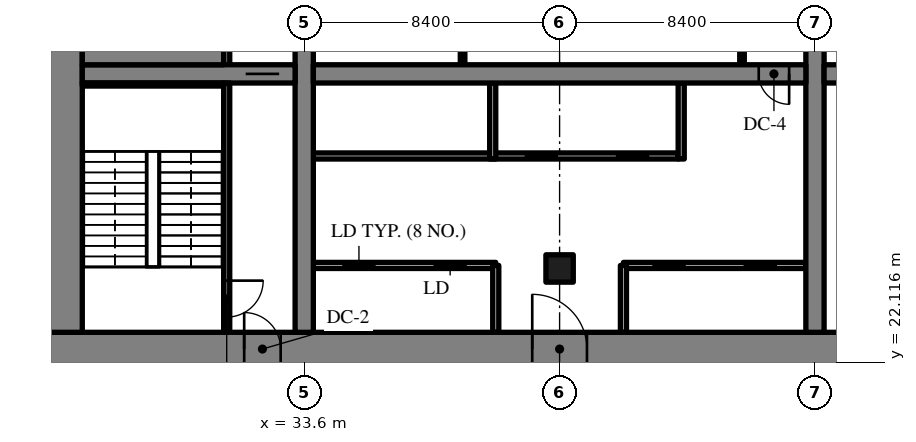
"""IFC4 building model, lengths in metres.
Left out: names, types, materials, properties, quantities, classifications, styles, units other than length and angle.
Written with IfcOpenShell. Run it as: python <this file> out.ifc"""

import sys

from ifc_helpers import new_model, si_unit, direction, frame, frame_2d, origin, origin_2d, place, context, subcontext, project, spatial, rectangle, extrude, source, transform, mapped, element, fill, save


model = new_model("IFC4")
c1 = context("Model", 3, precision=1e-05, world=origin(), true_north=direction((0.0, 1.0)))
c2 = subcontext(c1, "Body", "Model", "MODEL_VIEW")
j1 = project(units=[si_unit("LENGTHUNIT", "METRE"), si_unit("PLANEANGLEUNIT", "RADIAN")], contexts=[c1])
p1 = place(None, origin())
s1 = spatial("IfcSite", under=j1, at=p1, CompositionType="ELEMENT")
p2 = place(p1, origin())
s2 = spatial("IfcBuilding", under=s1, at=p2, CompositionType="ELEMENT")
p3 = place(p2, frame((0.0, 0.0, -4.5)))
s3 = spatial("IfcBuildingStorey", under=s2, at=p3, CompositionType="ELEMENT", Elevation=-4.5)
m1 = source(origin(), c2, "Body", "SweptSolid", [
    extrude(rectangle(XDim=50.4, YDim=1.1, at=frame_2d((25.2, 0.0))), origin(), (0.0, 0.0, 1.0), 4.22),
])
p4 = place(p3, frame((25.2, 22.55, 0.0), z_axis=(0.0, 0.0, 1.0), x_axis=(1.0, 0.0, 0.0)))
e1 = element("IfcWall", 1, at=p4, inside=s3, PredefinedType="SHEAR", context=c2, shape_type="MappedRepresentation", body=[
    mapped(m1, transform((0.0, 0.0, 0.0), scale=1.0)),
])
m2 = source(origin(), c2, "Body", "SweptSolid", [
    extrude(rectangle(XDim=1.8, YDim=2.1, at=frame_2d((0.9, 1.05))), frame((0.0, 0.56, 0.0), z_axis=(0.0, -1.0, 0.0), x_axis=(1.0, 0.0, 0.0)), (0.0, 0.0, 1.0), 1.12),
])
p5 = place(p4, frame((15.9, 0.0, 0.0)))
e2 = element("IfcOpeningElement", 2, at=p5, cuts=e1, PredefinedType="OPENING", context=c2, shape_type="MappedRepresentation", body=[
    mapped(m2, transform((0.0, 0.0, 0.0), scale=1.0)),
])
m3 = source(origin(), c2, "Body", "SweptSolid", [
    extrude(rectangle(XDim=1.2, YDim=2.1, at=frame_2d((0.6, 1.05))), frame((0.0, 0.56, 0.0), z_axis=(0.0, -1.0, 0.0), x_axis=(1.0, 0.0, 0.0)), (0.0, 0.0, 1.0), 1.12),
])
p6 = place(p4, frame((27.0, 0.0, 0.0)))
e3 = element("IfcOpeningElement", 3, at=p6, cuts=e1, PredefinedType="OPENING", context=c2, shape_type="MappedRepresentation", body=[
    mapped(m3, transform((0.0, 0.0, 0.0), scale=1.0)),
])
m4 = source(origin(), c2, "Body", "SweptSolid", [
    extrude(rectangle(XDim=0.9, YDim=2.1, at=frame_2d((0.45, 1.05))), frame((0.0, 0.56, 0.0), z_axis=(0.0, -1.0, 0.0), x_axis=(1.0, 0.0, 0.0)), (0.0, 0.0, 1.0), 1.12),
])
p7 = place(p4, frame((34.5, 0.0, 0.0)))
e4 = element("IfcOpeningElement", 4, at=p7, cuts=e1, PredefinedType="OPENING", context=c2, shape_type="MappedRepresentation", body=[
    mapped(m4, transform((0.0, 0.0, 0.0), scale=1.0)),
])
p8 = place(p4, frame((31.5, 0.0, 0.0)))
e5 = element("IfcOpeningElement", 5, at=p8, cuts=e1, PredefinedType="OPENING", context=c2, shape_type="MappedRepresentation", body=[
    mapped(m4, transform((0.0, 0.0, 0.0), scale=1.0)),
])
p9 = place(p4, frame((39.75, 0.0, 0.0)))
e6 = element("IfcOpeningElement", 6, at=p9, cuts=e1, PredefinedType="OPENING", context=c2, shape_type="MappedRepresentation", body=[
    mapped(m4, transform((0.0, 0.0, 0.0), scale=1.0)),
])
p10 = place(p4, frame((36.75, 0.0, 0.0)))
e7 = element("IfcOpeningElement", 7, at=p10, cuts=e1, PredefinedType="OPENING", context=c2, shape_type="MappedRepresentation", body=[
    mapped(m4, transform((0.0, 0.0, 0.0), scale=1.0)),
])
p11 = place(p4, frame((6.425, 0.0, 0.0)))
e8 = element("IfcOpeningElement", 8, at=p11, cuts=e1, PredefinedType="OPENING", context=c2, shape_type="MappedRepresentation", body=[
    mapped(m3, transform((0.0, 0.0, 0.0), scale=1.0)),
])
p12 = place(p4, frame((47.675, 0.0, 0.0)))
e9 = element("IfcOpeningElement", 9, at=p12, cuts=e1, PredefinedType="OPENING", context=c2, shape_type="MappedRepresentation", body=[
    mapped(m3, transform((0.0, 0.0, 0.0), scale=1.0)),
])
m5 = source(origin(), c2, "Body", "SweptSolid", [
    extrude(rectangle(XDim=17.8, YDim=1.1, at=frame_2d((8.9, 0.0))), origin(), (0.0, 0.0, 1.0), 4.22),
])
p13 = place(p3, frame((25.75, 23.1, 0.0), z_axis=(0.0, 0.0, 1.0), x_axis=(0.0, 1.0, 0.0)))
e10 = element("IfcWall", 10, at=p13, inside=s3, PredefinedType="SHEAR", context=c2, shape_type="MappedRepresentation", body=[
    mapped(m5, transform((0.0, 0.0, 0.0), scale=1.0)),
])
m6 = source(origin(), c2, "Body", "SweptSolid", [
    extrude(rectangle(XDim=17.8, YDim=0.6, at=frame_2d((8.9, 0.0))), origin(), (0.0, 0.0, 1.0), 4.22),
])
p14 = place(p3, frame((33.6, 23.1, 0.0), z_axis=(0.0, 0.0, 1.0), x_axis=(0.0, 1.0, 0.0)))
e11 = element("IfcWall", 11, at=p14, inside=s3, PredefinedType="SHEAR", context=c2, shape_type="MappedRepresentation", body=[
    mapped(m6, transform((0.0, 0.0, 0.0), scale=1.0)),
])
m7 = source(origin(), c2, "Body", "SweptSolid", [
    extrude(rectangle(XDim=1.1, YDim=2.1, at=frame_2d((0.55, 1.05))), frame((0.0, 0.31, 0.0), z_axis=(0.0, -1.0, 0.0), x_axis=(1.0, 0.0, 0.0)), (0.0, 0.0, 1.0), 0.62),
])
p15 = place(p14, frame((12.35, 0.0, 0.0)))
e12 = element("IfcOpeningElement", 12, at=p15, cuts=e11, PredefinedType="OPENING", context=c2, shape_type="MappedRepresentation", body=[
    mapped(m7, transform((0.0, 0.0, 0.0), scale=1.0)),
])
p16 = place(p3, frame((50.4, 23.1, 0.0), z_axis=(0.0, 0.0, 1.0), x_axis=(0.0, 1.0, 0.0)))
e13 = element("IfcWall", 13, at=p16, inside=s3, PredefinedType="SHEAR", context=c2, shape_type="MappedRepresentation", body=[
    mapped(m6, transform((0.0, 0.0, 0.0), scale=1.0)),
])
p17 = place(p16, frame((12.35, 0.0, 0.0)))
e14 = element("IfcOpeningElement", 14, at=p17, cuts=e13, PredefinedType="OPENING", context=c2, shape_type="MappedRepresentation", body=[
    mapped(m7, transform((0.0, 0.0, 0.0), scale=1.0)),
])
m8 = source(origin(), c2, "Body", "SweptSolid", [
    extrude(rectangle(XDim=7.0, YDim=0.6, at=frame_2d((3.5, 0.0))), origin(), (0.0, 0.0, 1.0), 4.22),
])
p18 = place(p3, frame((26.3, 31.6, 0.0), z_axis=(0.0, 0.0, 1.0), x_axis=(1.0, 0.0, 0.0)))
e15 = element("IfcWall", 15, at=p18, inside=s3, PredefinedType="SHEAR", context=c2, shape_type="MappedRepresentation", body=[
    mapped(m8, transform((0.0, 0.0, 0.0), scale=1.0)),
])
p19 = place(p18, frame((5.375, 0.0, 0.0)))
e16 = element("IfcOpeningElement", 16, at=p19, cuts=e15, PredefinedType="OPENING", context=c2, shape_type="MappedRepresentation", body=[
    mapped(m7, transform((0.0, 0.0, 0.0), scale=1.0)),
])
m9 = source(origin(), c2, "Body", "SweptSolid", [
    extrude(rectangle(XDim=16.2, YDim=0.6, at=frame_2d((8.1, 0.0))), origin(), (0.0, 0.0, 1.0), 4.22),
])
p20 = place(p3, frame((33.9, 31.6, 0.0), z_axis=(0.0, 0.0, 1.0), x_axis=(1.0, 0.0, 0.0)))
e17 = element("IfcWall", 17, at=p20, inside=s3, PredefinedType="SHEAR", context=c2, shape_type="MappedRepresentation", body=[
    mapped(m9, transform((0.0, 0.0, 0.0), scale=1.0)),
])
m10 = source(origin(), c2, "Body", "SweptSolid", [
    extrude(rectangle(XDim=1.0, YDim=2.1, at=frame_2d((0.5, 1.05))), frame((0.0, 0.31, 0.0), z_axis=(0.0, -1.0, 0.0), x_axis=(1.0, 0.0, 0.0)), (0.0, 0.0, 1.0), 0.62),
])
p21 = place(p20, frame((14.65, 0.0, 0.0)))
e18 = element("IfcOpeningElement", 18, at=p21, cuts=e17, PredefinedType="OPENING", context=c2, shape_type="MappedRepresentation", body=[
    mapped(m10, transform((0.0, 0.0, 0.0), scale=1.0)),
])
m11 = source(origin(), c2, "Body", "SweptSolid", [
    extrude(rectangle(XDim=16.2, YDim=0.6, at=frame_2d((8.1, 0.0))), origin(), (0.0, 0.0, 1.0), 4.22),
])
p22 = place(p3, frame((50.7, 31.6, 0.0), z_axis=(0.0, 0.0, 1.0), x_axis=(1.0, 0.0, 0.0)))
e19 = element("IfcWall", 19, at=p22, inside=s3, PredefinedType="SHEAR", context=c2, shape_type="MappedRepresentation", body=[
    mapped(m11, transform((0.0, 0.0, 0.0), scale=1.0)),
])
p23 = place(p22, frame((0.55, 0.0, 0.0)))
e20 = element("IfcOpeningElement", 20, at=p23, cuts=e19, PredefinedType="OPENING", context=c2, shape_type="MappedRepresentation", body=[
    mapped(m10, transform((0.0, 0.0, 0.0), scale=1.0)),
])
m12 = source(origin(), c2, "Body", "SweptSolid", [
    extrude(rectangle(XDim=0.9, YDim=0.9, at=origin_2d()), origin(), (0.0, 0.0, 1.0), 4.22),
])
p24 = place(p3, frame((42.0, 25.2, 0.0), z_axis=(0.0, 0.0, 1.0), x_axis=(1.0, 0.0, 0.0)))
e21 = element("IfcColumn", 21, at=p24, inside=s3, PredefinedType="COLUMN", context=c2, shape_type="MappedRepresentation", body=[
    mapped(m12, transform((0.0, 0.0, 0.0), scale=1.0)),
])
m13 = source(origin(), c2, "Body", "SweptSolid", [
    extrude(rectangle(XDim=6.0, YDim=0.2, at=frame_2d((3.0, 0.0))), origin(), (0.0, 0.0, 1.0), 4.22),
])
p25 = place(p3, frame((33.9, 25.3, 0.0), z_axis=(0.0, 0.0, 1.0), x_axis=(1.0, 0.0, 0.0)))
e22 = element("IfcWall", 22, at=p25, inside=s3, PredefinedType="SOLIDWALL", context=c2, shape_type="MappedRepresentation", body=[
    mapped(m13, transform((0.0, 0.0, 0.0), scale=1.0)),
])
m14 = source(origin(), c2, "Body", "SweptSolid", [
    extrude(rectangle(XDim=1.1, YDim=2.1, at=frame_2d((0.55, 1.05))), frame((0.0, 0.11, 0.0), z_axis=(0.0, -1.0, 0.0), x_axis=(1.0, 0.0, 0.0)), (0.0, 0.0, 1.0), 0.22),
])
p26 = place(p25, frame((0.95, 0.0, 0.0)))
e23 = element("IfcOpeningElement", 23, at=p26, cuts=e22, PredefinedType="OPENING", context=c2, shape_type="MappedRepresentation", body=[
    mapped(m14, transform((0.0, 0.0, 0.0), scale=1.0)),
])
p27 = place(p25, frame((3.95, 0.0, 0.0)))
e24 = element("IfcOpeningElement", 24, at=p27, cuts=e22, PredefinedType="OPENING", context=c2, shape_type="MappedRepresentation", body=[
    mapped(m14, transform((0.0, 0.0, 0.0), scale=1.0)),
])
p28 = place(p3, frame((44.1, 25.3, 0.0), z_axis=(0.0, 0.0, 1.0), x_axis=(1.0, 0.0, 0.0)))
e25 = element("IfcWall", 25, at=p28, inside=s3, PredefinedType="SOLIDWALL", context=c2, shape_type="MappedRepresentation", body=[
    mapped(m13, transform((0.0, 0.0, 0.0), scale=1.0)),
])
p29 = place(p28, frame((0.95, 0.0, 0.0)))
e26 = element("IfcOpeningElement", 26, at=p29, cuts=e25, PredefinedType="OPENING", context=c2, shape_type="MappedRepresentation", body=[
    mapped(m14, transform((0.0, 0.0, 0.0), scale=1.0)),
])
p30 = place(p28, frame((3.95, 0.0, 0.0)))
e27 = element("IfcOpeningElement", 27, at=p30, cuts=e25, PredefinedType="OPENING", context=c2, shape_type="MappedRepresentation", body=[
    mapped(m14, transform((0.0, 0.0, 0.0), scale=1.0)),
])
m15 = source(origin(), c2, "Body", "SweptSolid", [
    extrude(rectangle(XDim=12.0, YDim=0.2, at=frame_2d((6.0, 0.0))), origin(), (0.0, 0.0, 1.0), 4.22),
])
p31 = place(p3, frame((33.9, 28.9, 0.0), z_axis=(0.0, 0.0, 1.0), x_axis=(1.0, 0.0, 0.0)))
e28 = element("IfcWall", 28, at=p31, inside=s3, PredefinedType="SOLIDWALL", context=c2, shape_type="MappedRepresentation", body=[
    mapped(m15, transform((0.0, 0.0, 0.0), scale=1.0)),
])
p32 = place(p31, frame((6.95, 0.0, 0.0)))
e29 = element("IfcOpeningElement", 29, at=p32, cuts=e28, PredefinedType="OPENING", context=c2, shape_type="MappedRepresentation", body=[
    mapped(m14, transform((0.0, 0.0, 0.0), scale=1.0)),
])
p33 = place(p31, frame((9.95, 0.0, 0.0)))
e30 = element("IfcOpeningElement", 30, at=p33, cuts=e28, PredefinedType="OPENING", context=c2, shape_type="MappedRepresentation", body=[
    mapped(m14, transform((0.0, 0.0, 0.0), scale=1.0)),
])
m16 = source(origin(), c2, "Body", "SweptSolid", [
    extrude(rectangle(XDim=2.2, YDim=0.2, at=frame_2d((1.1, 0.0))), origin(), (0.0, 0.0, 1.0), 4.22),
])
for number, where, z_axis, x_axis in (
    (31, (39.9, 23.1, 0.0), (0.0, 0.0, 1.0), (0.0, 1.0, 0.0)),
    (32, (44.1, 23.1, 0.0), (0.0, 0.0, 1.0), (0.0, 1.0, 0.0)),
):
    element("IfcWall", number, at=place(p3, frame(where, z_axis=z_axis, x_axis=x_axis)), inside=s3, PredefinedType="SOLIDWALL", context=c2, shape_type="MappedRepresentation", body=[
        mapped(m16, transform((0.0, 0.0, 0.0), scale=1.0)),
    ])
m17 = source(origin(), c2, "Body", "SweptSolid", [
    extrude(rectangle(XDim=2.5, YDim=0.2, at=frame_2d((1.25, 0.0))), origin(), (0.0, 0.0, 1.0), 4.22),
])
for number, where, z_axis, x_axis in (
    (33, (46.0, 28.8, 0.0), (0.0, 0.0, 1.0), (0.0, 1.0, 0.0)),
    (34, (39.8, 28.8, 0.0), (0.0, 0.0, 1.0), (0.0, 1.0, 0.0)),
):
    element("IfcWall", number, at=place(p3, frame(where, z_axis=z_axis, x_axis=x_axis)), inside=s3, PredefinedType="SOLIDWALL", context=c2, shape_type="MappedRepresentation", body=[
        mapped(m17, transform((0.0, 0.0, 0.0), scale=1.0)),
    ])
m18 = source(origin(), c2, "Body", "SweptSolid", [
    extrude(rectangle(XDim=3.1, YDim=0.15, at=frame_2d((1.55, 0.0))), origin(), (0.0, 0.0, 1.0), 4.22),
])
for number, where, z_axis, x_axis in (
    (35, (48.0, 31.9, 0.0), (0.0, 0.0, 1.0), (0.0, 1.0, 0.0)),
    (36, (38.809, 31.9, 0.0), (0.0, 0.0, 1.0), (0.0, 1.0, 0.0)),
):
    element("IfcWall", number, at=place(p3, frame(where, z_axis=z_axis, x_axis=x_axis)), inside=s3, PredefinedType="PARTITIONING", context=c2, shape_type="MappedRepresentation", body=[
        mapped(m18, transform((0.0, 0.0, 0.0), scale=1.0)),
    ])
m19 = source(origin(), c2, "Body", "SweptSolid", [
    extrude(rectangle(XDim=8.2, YDim=0.2, at=frame_2d((4.1, 0.0))), origin(), (0.0, 0.0, 1.0), 4.22),
])
p34 = place(p3, frame((31.05, 23.1, 0.0), z_axis=(0.0, 0.0, 1.0), x_axis=(0.0, 1.0, 0.0)))
e37 = element("IfcWall", 37, at=p34, inside=s3, PredefinedType="SOLIDWALL", context=c2, shape_type="MappedRepresentation", body=[
    mapped(m19, transform((0.0, 0.0, 0.0), scale=1.0)),
])
m20 = source(origin(), c2, "Body", "SweptSolid", [
    extrude(rectangle(XDim=1.2, YDim=2.1, at=frame_2d((0.6, 1.05))), frame((0.0, 0.11, 0.0), z_axis=(0.0, -1.0, 0.0), x_axis=(1.0, 0.0, 0.0)), (0.0, 0.0, 1.0), 0.22),
])
p35 = place(p34, frame((0.5, 0.0, 0.0)))
e38 = element("IfcOpeningElement", 38, at=p35, cuts=e37, PredefinedType="OPENING", context=c2, shape_type="MappedRepresentation", body=[
    mapped(m20, transform((0.0, 0.0, 0.0), scale=1.0)),
])
m21 = source(origin(), c2, "Body", "SweptSolid", [
    extrude(rectangle(XDim=1.7, YDim=0.2, at=frame_2d((0.85, 0.0))), origin(), (0.0, 0.0, 1.0), 4.22),
])
p36 = place(p3, frame((31.05, 31.9, 0.0), z_axis=(0.0, 0.0, 1.0), x_axis=(0.0, 1.0, 0.0)))
e39 = element("IfcWall", 39, at=p36, inside=s3, PredefinedType="SOLIDWALL", context=c2, shape_type="MappedRepresentation", body=[
    mapped(m21, transform((0.0, 0.0, 0.0), scale=1.0)),
])
m22 = source(origin(), c2, "Body", "SweptSolid", [
    extrude(rectangle(XDim=4.65, YDim=0.1, at=frame_2d((2.325, 0.0))), origin(), (0.0, 0.0, 1.0), 4.22),
])
p37 = place(p3, frame((26.3, 31.25, 0.0), z_axis=(0.0, 0.0, 1.0), x_axis=(1.0, 0.0, 0.0)))
e40 = element("IfcWall", 40, at=p37, inside=s3, PredefinedType="SOLIDWALL", context=c2, shape_type="MappedRepresentation", body=[
    mapped(m22, transform((0.0, 0.0, 0.0), scale=1.0)),
])
m23 = source(origin(), c2, "Body", "SweptSolid", [
    extrude(rectangle(XDim=4.65, YDim=0.9, at=frame_2d((2.325, 0.0))), origin(), (0.0, 0.0, 1.0), 4.22),
])
p38 = place(p3, frame((26.3, 32.35, 0.0), z_axis=(0.0, 0.0, 1.0), x_axis=(1.0, 0.0, 0.0)))
e41 = element("IfcWall", 41, at=p38, inside=s3, PredefinedType="SOLIDWALL", context=c2, shape_type="MappedRepresentation", body=[
    mapped(m23, transform((0.0, 0.0, 0.0), scale=1.0)),
])
m24 = source(origin(), c2, "Body", "SweptSolid", [
    extrude(rectangle(XDim=1.8, YDim=2.1, at=frame_2d((0.9, 1.05))), frame((0.0, 0.325, 0.0), z_axis=(0.0, -1.0, 0.0), x_axis=(1.0, 0.0, 0.0)), (0.0, 0.0, 1.0), 0.05),
])
p39 = place(p5, origin())
e42 = element("IfcDoor", 42, at=p39, inside=s3, OperationType="DOUBLE_DOOR_SINGLE_SWING", PredefinedType="DOOR", context=c2, shape_type="MappedRepresentation", body=[
    mapped(m24, transform((0.0, 0.0, 0.0), scale=1.0)),
])
fill(e2, e42)
m25 = source(origin(), c2, "Body", "SweptSolid", [
    extrude(rectangle(XDim=1.0, YDim=2.1, at=frame_2d((0.5, 1.05))), frame((0.0, 0.025, 0.0), z_axis=(0.0, -1.0, 0.0), x_axis=(1.0, 0.0, 0.0)), (0.0, 0.0, 1.0), 0.05),
])
p40 = place(p21, origin())
e43 = element("IfcDoor", 43, at=p40, inside=s3, OperationType="SINGLE_SWING_RIGHT", PredefinedType="DOOR", context=c2, shape_type="MappedRepresentation", body=[
    mapped(m25, transform((0.0, 0.0, 0.0), scale=1.0)),
])
fill(e18, e43)
m26 = source(origin(), c2, "Body", "SweptSolid", [
    extrude(rectangle(XDim=1.1, YDim=2.1, at=frame_2d((0.55, 1.05))), frame((0.0, 0.025, 0.0), z_axis=(0.0, -1.0, 0.0), x_axis=(1.0, 0.0, 0.0)), (0.0, 0.0, 1.0), 0.05),
])
p41 = place(p26, origin())
e44 = element("IfcDoor", 44, at=p41, inside=s3, OperationType="SLIDING_TO_LEFT", PredefinedType="DOOR", context=c2, shape_type="MappedRepresentation", body=[
    mapped(m26, transform((0.0, 0.0, 0.0), scale=1.0)),
])
fill(e23, e44)
p42 = place(p27, origin())
e45 = element("IfcDoor", 45, at=p42, inside=s3, OperationType="SLIDING_TO_RIGHT", PredefinedType="DOOR", context=c2, shape_type="MappedRepresentation", body=[
    mapped(m26, transform((0.0, 0.0, 0.0), scale=1.0)),
])
fill(e24, e45)
p43 = place(p29, origin())
e46 = element("IfcDoor", 46, at=p43, inside=s3, OperationType="SLIDING_TO_LEFT", PredefinedType="DOOR", context=c2, shape_type="MappedRepresentation", body=[
    mapped(m26, transform((0.0, 0.0, 0.0), scale=1.0)),
])
fill(e26, e46)
p44 = place(p30, origin())
e47 = element("IfcDoor", 47, at=p44, inside=s3, OperationType="SLIDING_TO_RIGHT", PredefinedType="DOOR", context=c2, shape_type="MappedRepresentation", body=[
    mapped(m26, transform((0.0, 0.0, 0.0), scale=1.0)),
])
fill(e27, e47)
p45 = place(p32, origin())
e48 = element("IfcDoor", 48, at=p45, inside=s3, OperationType="SLIDING_TO_LEFT", PredefinedType="DOOR", context=c2, shape_type="MappedRepresentation", body=[
    mapped(m26, transform((0.0, 0.0, 0.0), scale=1.0)),
])
fill(e29, e48)
p46 = place(p33, origin())
e49 = element("IfcDoor", 49, at=p46, inside=s3, OperationType="SLIDING_TO_RIGHT", PredefinedType="DOOR", context=c2, shape_type="MappedRepresentation", body=[
    mapped(m26, transform((0.0, 0.0, 0.0), scale=1.0)),
])
fill(e30, e49)
m27 = source(origin(), c2, "Body", "SweptSolid", [
    extrude(rectangle(XDim=1.2, YDim=2.1, at=frame_2d((0.6, 1.05))), frame((0.0, 0.025, 0.0), z_axis=(0.0, -1.0, 0.0), x_axis=(1.0, 0.0, 0.0)), (0.0, 0.0, 1.0), 0.05),
])
p47 = place(p35, origin())
e50 = element("IfcDoor", 50, at=p47, inside=s3, OperationType="SINGLE_SWING_RIGHT", PredefinedType="DOOR", context=c2, shape_type="MappedRepresentation", body=[
    mapped(m27, transform((0.0, 0.0, 0.0), scale=1.0)),
])
fill(e38, e50)
m28 = source(origin(), c2, "Body", "SweptSolid", [
    extrude(rectangle(XDim=1.2, YDim=2.1, at=frame_2d((0.6, 1.05))), frame((0.0, 0.325, 0.0), z_axis=(0.0, -1.0, 0.0), x_axis=(1.0, 0.0, 0.0)), (0.0, 0.0, 1.0), 0.05),
])
p48 = place(p11, origin())
e51 = element("IfcDoor", 51, at=p48, inside=s3, OperationType="SINGLE_SWING_LEFT", PredefinedType="DOOR", context=c2, shape_type="MappedRepresentation", body=[
    mapped(m28, transform((0.0, 0.0, 0.0), scale=1.0)),
])
fill(e8, e51)
p49 = place(p19, origin())
e52 = element("IfcDoor", 52, at=p49, inside=s3, OperationType="SLIDING_TO_RIGHT", PredefinedType="DOOR", context=c2, shape_type="MappedRepresentation", body=[
    mapped(m26, transform((0.0, 0.0, 0.0), scale=1.0)),
])
fill(e16, e52)
save(model, sys.argv[1])
